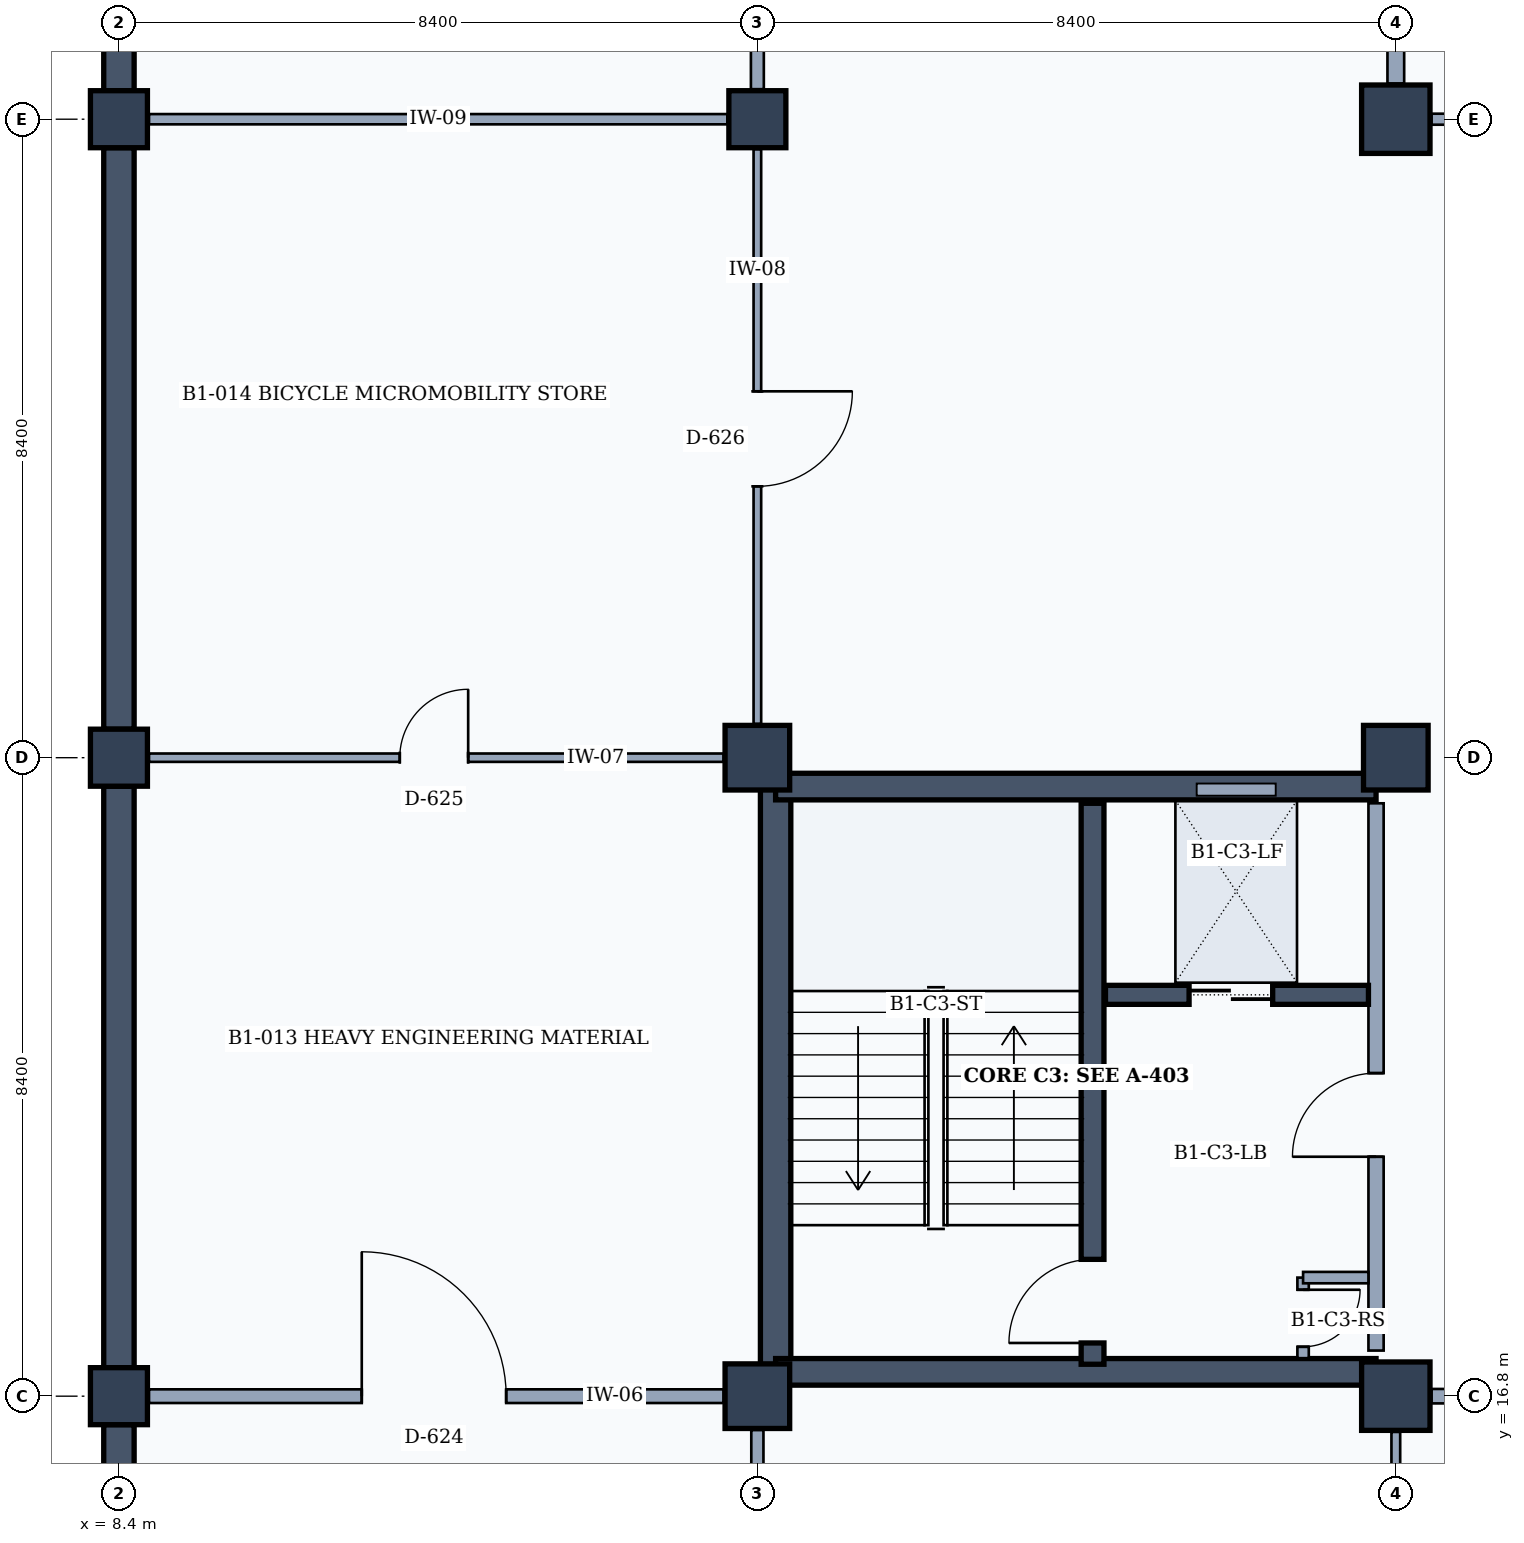
"""IFC4 building model, lengths in metres.
Left out: names, types, materials, properties, quantities, classifications, styles, units other than length and angle.
Written with IfcOpenShell. Run it as: python <this file> out.ifc"""

import sys

from ifc_helpers import new_model, si_unit, direction, frame, frame_2d, origin, origin_2d, place, context, subcontext, project, spatial, rectangle, extrude, element, fill, save


model = new_model("IFC4")
c1 = context("Model", 3, precision=1e-05, world=origin(), true_north=direction((0.0, 1.0)))
c2 = subcontext(c1, "Body", "Model", "MODEL_VIEW")
j1 = project(units=[si_unit("LENGTHUNIT", "METRE"), si_unit("PLANEANGLEUNIT", "RADIAN")], contexts=[c1])
p1 = place(None, origin())
s1 = spatial("IfcSite", under=j1, at=p1, CompositionType="ELEMENT")
p2 = place(p1, origin())
s2 = spatial("IfcBuilding", under=s1, at=p2, CompositionType="ELEMENT")
p3 = place(p2, frame((0.0, 0.0, -4.2)))
s3 = spatial("IfcBuildingStorey", under=s2, at=p3, CompositionType="ELEMENT", Elevation=-4.2)
for number, where, z_axis, x_axis in (
    (1, (8.4, 16.8, 0.0), (0.0, 0.0, 1.0), (1.0, 0.0, 0.0)),
    (2, (8.4, 25.2, 0.0), (0.0, 0.0, 1.0), (1.0, 0.0, 0.0)),
    (3, (8.4, 33.6, 0.0), (0.0, 0.0, 1.0), (1.0, 0.0, 0.0)),
):
    element("IfcColumn", number, at=place(p3, frame(where, z_axis=z_axis, x_axis=x_axis)), inside=s3, PredefinedType="COLUMN", context=c2, shape_type="SweptSolid", body=[
        extrude(rectangle(XDim=0.75, YDim=0.75, at=origin_2d()), origin(), (0.0, 0.0, 1.0), 4.2),
    ])
for number, where, z_axis, x_axis in (
    (4, (16.8, 16.8, 0.0), (0.0, 0.0, 1.0), (1.0, 0.0, 0.0)),
    (5, (16.8, 25.2, 0.0), (0.0, 0.0, 1.0), (1.0, 0.0, 0.0)),
):
    element("IfcColumn", number, at=place(p3, frame(where, z_axis=z_axis, x_axis=x_axis)), inside=s3, PredefinedType="COLUMN", context=c2, shape_type="SweptSolid", body=[
        extrude(rectangle(XDim=0.85, YDim=0.85, at=origin_2d()), origin(), (0.0, 0.0, 1.0), 4.2),
    ])
p4 = place(p3, frame((16.8, 33.6, 0.0), z_axis=(0.0, 0.0, 1.0), x_axis=(1.0, 0.0, 0.0)))
e6 = element("IfcColumn", 6, at=p4, inside=s3, PredefinedType="COLUMN", context=c2, shape_type="SweptSolid", body=[
    extrude(rectangle(XDim=0.75, YDim=0.75, at=origin_2d()), origin(), (0.0, 0.0, 1.0), 4.2),
])
p5 = place(p3, frame((25.2, 16.8, 0.0), z_axis=(0.0, 0.0, 1.0), x_axis=(1.0, 0.0, 0.0)))
e7 = element("IfcColumn", 7, at=p5, inside=s3, PredefinedType="COLUMN", context=c2, shape_type="SweptSolid", body=[
    extrude(rectangle(XDim=0.9, YDim=0.9, at=origin_2d()), origin(), (0.0, 0.0, 1.0), 4.2),
])
p6 = place(p3, frame((25.2, 25.2, 0.0), z_axis=(0.0, 0.0, 1.0), x_axis=(1.0, 0.0, 0.0)))
e8 = element("IfcColumn", 8, at=p6, inside=s3, PredefinedType="COLUMN", context=c2, shape_type="SweptSolid", body=[
    extrude(rectangle(XDim=0.85, YDim=0.85, at=origin_2d()), origin(), (0.0, 0.0, 1.0), 4.2),
])
p7 = place(p3, frame((25.2, 33.6, 0.0), z_axis=(0.0, 0.0, 1.0), x_axis=(1.0, 0.0, 0.0)))
e9 = element("IfcColumn", 9, at=p7, inside=s3, PredefinedType="COLUMN", context=c2, shape_type="SweptSolid", body=[
    extrude(rectangle(XDim=0.9, YDim=0.9, at=origin_2d()), origin(), (0.0, 0.0, 1.0), 4.2),
])
p8 = place(p3, frame((8.4, 8.775, 0.0), z_axis=(0.0, 0.0, 1.0), x_axis=(0.0, 1.0, 0.0)))
e10 = element("IfcWall", 10, at=p8, inside=s3, PredefinedType="STANDARD", context=c2, shape_type="SweptSolid", body=[
    extrude(rectangle(XDim=7.65, YDim=0.4, at=frame_2d((3.825, 0.0))), origin(), (0.0, 0.0, 1.0), 3.88),
])
p9 = place(p3, frame((8.4, 17.175, 0.0), z_axis=(0.0, 0.0, 1.0), x_axis=(0.0, 1.0, 0.0)))
e11 = element("IfcWall", 11, at=p9, inside=s3, PredefinedType="STANDARD", context=c2, shape_type="SweptSolid", body=[
    extrude(rectangle(XDim=7.65, YDim=0.4, at=frame_2d((3.825, 0.0))), origin(), (0.0, 0.0, 1.0), 3.88),
])
p10 = place(p3, frame((8.4, 25.575, 0.0), z_axis=(0.0, 0.0, 1.0), x_axis=(0.0, 1.0, 0.0)))
e12 = element("IfcWall", 12, at=p10, inside=s3, PredefinedType="STANDARD", context=c2, shape_type="SweptSolid", body=[
    extrude(rectangle(XDim=7.65, YDim=0.4, at=frame_2d((3.825, 0.0))), origin(), (0.0, 0.0, 1.0), 3.88),
])
p11 = place(p3, frame((8.4, 33.975, 0.0), z_axis=(0.0, 0.0, 1.0), x_axis=(0.0, 1.0, 0.0)))
e13 = element("IfcWall", 13, at=p11, inside=s3, PredefinedType="STANDARD", context=c2, shape_type="SweptSolid", body=[
    extrude(rectangle(XDim=7.7, YDim=0.4, at=frame_2d((3.85, 0.0))), origin(), (0.0, 0.0, 1.0), 3.88),
])
p12 = place(p3, frame((17.04, 17.05, 0.0), z_axis=(0.0, 0.0, 1.0), x_axis=(0.0, 1.0, 0.0)))
e14 = element("IfcWall", 14, at=p12, inside=s3, PredefinedType="SHEAR", context=c2, shape_type="SweptSolid", body=[
    extrude(rectangle(XDim=7.94, YDim=0.4, at=frame_2d((3.97, 0.0))), origin(), (0.0, 0.0, 1.0), 3.9),
])
p13 = place(p3, frame((17.04, 24.82, 0.0), z_axis=(0.0, 0.0, 1.0), x_axis=(1.0, 0.0, 0.0)))
e15 = element("IfcWall", 15, at=p13, inside=s3, PredefinedType="SHEAR", context=c2, shape_type="SweptSolid", body=[
    extrude(rectangle(XDim=7.9, YDim=0.35, at=frame_2d((3.95, 0.0))), origin(), (0.0, 0.0, 1.0), 3.9),
])
p14 = place(p3, frame((24.94, 24.6, 0.0), z_axis=(0.0, 0.0, 1.0), x_axis=(0.0, -1.0, 0.0)))
e16 = element("IfcWall", 16, at=p14, inside=s3, PredefinedType="PARTITIONING", context=c2, shape_type="SweptSolid", body=[
    extrude(rectangle(XDim=7.2, YDim=0.2, at=frame_2d((3.6, 0.0))), origin(), (0.0, 0.0, 1.0), 3.25),
])
p15 = place(p14, frame((3.55, 0.0, 0.0)))
e17 = element("IfcOpeningElement", 17, at=p15, cuts=e16, PredefinedType="OPENING", context=c2, shape_type="SweptSolid", body=[
    extrude(rectangle(XDim=1.1, YDim=2.15, at=frame_2d((0.55, 1.075))), frame((0.0, 0.11, 0.0), z_axis=(0.0, -1.0, 0.0), x_axis=(1.0, 0.0, 0.0)), (0.0, 0.0, 1.0), 0.22),
])
p16 = place(p3, frame((24.94, 17.12, 0.0), z_axis=(0.0, 0.0, 1.0), x_axis=(-1.0, 0.0, 0.0)))
e18 = element("IfcWall", 18, at=p16, inside=s3, PredefinedType="SHEAR", context=c2, shape_type="SweptSolid", body=[
    extrude(rectangle(XDim=7.9, YDim=0.35, at=frame_2d((3.95, 0.0))), origin(), (0.0, 0.0, 1.0), 3.9),
])
p17 = place(p3, frame((21.21, 17.22, 0.0), z_axis=(0.0, 0.0, 1.0), x_axis=(0.0, 1.0, 0.0)))
e19 = element("IfcWall", 19, at=p17, inside=s3, PredefinedType="SHEAR", context=c2, shape_type="SweptSolid", body=[
    extrude(rectangle(XDim=7.38, YDim=0.3, at=frame_2d((3.69, 0.0))), origin(), (0.0, 0.0, 1.0), 3.9),
])
p18 = place(p17, frame((0.28, 0.0, 0.0)))
e20 = element("IfcOpeningElement", 20, at=p18, cuts=e19, PredefinedType="OPENING", context=c2, shape_type="SweptSolid", body=[
    extrude(rectangle(XDim=1.1, YDim=2.15, at=frame_2d((0.55, 1.075))), frame((0.0, 0.16, 0.0), z_axis=(0.0, -1.0, 0.0), x_axis=(1.0, 0.0, 0.0)), (0.0, 0.0, 1.0), 0.32),
])
p19 = place(p3, frame((23.98, 18.36, 0.0), z_axis=(0.0, 0.0, 1.0), x_axis=(0.0, -1.0, 0.0)))
e21 = element("IfcWall", 21, at=p19, inside=s3, PredefinedType="PARTITIONING", context=c2, shape_type="SweptSolid", body=[
    extrude(rectangle(XDim=1.06, YDim=0.15, at=frame_2d((0.53, 0.0))), origin(), (0.0, 0.0, 1.0), 3.32),
])
p20 = place(p19, frame((0.16, 0.0, 0.0)))
e22 = element("IfcOpeningElement", 22, at=p20, cuts=e21, PredefinedType="OPENING", context=c2, shape_type="SweptSolid", body=[
    extrude(rectangle(XDim=0.75, YDim=2.05, at=frame_2d((0.375, 1.025))), frame((0.0, 0.085, 0.0), z_axis=(0.0, -1.0, 0.0), x_axis=(1.0, 0.0, 0.0)), (0.0, 0.0, 1.0), 0.17),
])
p21 = place(p3, frame((23.98, 18.36, 0.0), z_axis=(0.0, 0.0, 1.0), x_axis=(1.0, 0.0, 0.0)))
e23 = element("IfcWall", 23, at=p21, inside=s3, PredefinedType="PARTITIONING", context=c2, shape_type="SweptSolid", body=[
    extrude(rectangle(XDim=0.86, YDim=0.15, at=frame_2d((0.43, 0.0))), origin(), (0.0, 0.0, 1.0), 3.32),
])
p22 = place(p3, frame((21.38, 22.08, 0.0), z_axis=(0.0, 0.0, 1.0), x_axis=(1.0, 0.0, 0.0)))
e24 = element("IfcWall", 24, at=p22, inside=s3, PredefinedType="SHEAR", context=c2, shape_type="SweptSolid", body=[
    extrude(rectangle(XDim=3.46, YDim=0.25, at=frame_2d((1.73, 0.0))), origin(), (0.0, 0.0, 1.0), 3.9),
])
p23 = place(p22, frame((1.1, 0.0, 0.0)))
e25 = element("IfcOpeningElement", 25, at=p23, cuts=e24, PredefinedType="OPENING", context=c2, shape_type="SweptSolid", body=[
    extrude(rectangle(XDim=1.1, YDim=2.15, at=frame_2d((0.55, 1.075))), frame((0.0, 0.135, 0.0), z_axis=(0.0, -1.0, 0.0), x_axis=(1.0, 0.0, 0.0)), (0.0, 0.0, 1.0), 0.27),
])
p24 = place(p3, frame((16.8, 8.795, 0.0), z_axis=(0.0, 0.0, 1.0), x_axis=(0.0, 1.0, 0.0)))
e26 = element("IfcWall", 26, at=p24, inside=s3, PredefinedType="PARTITIONING", context=c2, shape_type="SweptSolid", body=[
    extrude(rectangle(XDim=7.56, YDim=0.16, at=frame_2d((3.78, 0.0))), origin(), (0.0, 0.0, 1.0), 3.25),
])
p25 = place(p3, frame((8.795, 16.8, 0.0), z_axis=(0.0, 0.0, 1.0), x_axis=(1.0, 0.0, 0.0)))
e27 = element("IfcWall", 27, at=p25, inside=s3, PredefinedType="PARTITIONING", context=c2, shape_type="SweptSolid", body=[
    extrude(rectangle(XDim=7.56, YDim=0.18, at=frame_2d((3.78, 0.0))), origin(), (0.0, 0.0, 1.0), 3.05),
])
p26 = place(p25, frame((2.8, 0.0, 0.0)))
e28 = element("IfcOpeningElement", 28, at=p26, cuts=e27, PredefinedType="OPENING", context=c2, shape_type="SweptSolid", body=[
    extrude(rectangle(XDim=1.9, YDim=2.4, at=frame_2d((0.95, 1.2))), frame((0.0, 0.1, 0.0), z_axis=(0.0, -1.0, 0.0), x_axis=(1.0, 0.0, 0.0)), (0.0, 0.0, 1.0), 0.2),
])
p27 = place(p3, frame((8.795, 25.2, 0.0), z_axis=(0.0, 0.0, 1.0), x_axis=(1.0, 0.0, 0.0)))
e29 = element("IfcWall", 29, at=p27, inside=s3, PredefinedType="PARTITIONING", context=c2, shape_type="SweptSolid", body=[
    extrude(rectangle(XDim=7.56, YDim=0.11, at=frame_2d((3.78, 0.0))), origin(), (0.0, 0.0, 1.0), 3.05),
])
p28 = place(p27, frame((3.3, 0.0, 0.0)))
e30 = element("IfcOpeningElement", 30, at=p28, cuts=e29, PredefinedType="OPENING", context=c2, shape_type="SweptSolid", body=[
    extrude(rectangle(XDim=0.9, YDim=2.1, at=frame_2d((0.45, 1.05))), frame((0.0, 0.065, 0.0), z_axis=(0.0, -1.0, 0.0), x_axis=(1.0, 0.0, 0.0)), (0.0, 0.0, 1.0), 0.13),
])
p29 = place(p3, frame((16.8, 25.645, 0.0), z_axis=(0.0, 0.0, 1.0), x_axis=(0.0, 1.0, 0.0)))
e31 = element("IfcWall", 31, at=p29, inside=s3, PredefinedType="MOVABLE", context=c2, shape_type="SweptSolid", body=[
    extrude(rectangle(XDim=7.56, YDim=0.1, at=frame_2d((3.78, 0.0))), origin(), (0.0, 0.0, 1.0), 3.25),
])
p30 = place(p29, frame((3.125, 0.0, 0.0)))
e32 = element("IfcOpeningElement", 32, at=p30, cuts=e31, PredefinedType="OPENING", context=c2, shape_type="SweptSolid", body=[
    extrude(rectangle(XDim=1.25, YDim=2.3, at=frame_2d((0.625, 1.15))), frame((0.0, 0.06, 0.0), z_axis=(0.0, -1.0, 0.0), x_axis=(1.0, 0.0, 0.0)), (0.0, 0.0, 1.0), 0.12),
])
p31 = place(p3, frame((8.795, 33.6, 0.0), z_axis=(0.0, 0.0, 1.0), x_axis=(1.0, 0.0, 0.0)))
e33 = element("IfcWall", 33, at=p31, inside=s3, PredefinedType="PARTITIONING", context=c2, shape_type="SweptSolid", body=[
    extrude(rectangle(XDim=7.61, YDim=0.135, at=frame_2d((3.805, 0.0))), origin(), (0.0, 0.0, 1.0), 3.05),
])
p32 = place(p3, frame((16.8, 33.995, 0.0), z_axis=(0.0, 0.0, 1.0), x_axis=(0.0, 1.0, 0.0)))
e34 = element("IfcWall", 34, at=p32, inside=s3, PredefinedType="PARTITIONING", context=c2, shape_type="SweptSolid", body=[
    extrude(rectangle(XDim=7.66, YDim=0.17, at=frame_2d((3.83, 0.0))), origin(), (0.0, 0.0, 1.0), 3.25),
])
p33 = place(p32, frame((3.075, 0.0, 0.0)))
e35 = element("IfcOpeningElement", 35, at=p33, cuts=e34, PredefinedType="OPENING", context=c2, shape_type="SweptSolid", body=[
    extrude(rectangle(XDim=1.35, YDim=2.25, at=frame_2d((0.675, 1.125))), frame((0.0, 0.095, 0.0), z_axis=(0.0, -1.0, 0.0), x_axis=(1.0, 0.0, 0.0)), (0.0, 0.0, 1.0), 0.19),
])
p34 = place(p3, frame((25.2, 8.795, 0.0), z_axis=(0.0, 0.0, 1.0), x_axis=(0.0, 1.0, 0.0)))
e36 = element("IfcWall", 36, at=p34, inside=s3, PredefinedType="PARTITIONING", context=c2, shape_type="SweptSolid", body=[
    extrude(rectangle(XDim=7.535, YDim=0.115, at=frame_2d((3.768, 0.0))), origin(), (0.0, 0.0, 1.0), 3.25),
])
p35 = place(p34, frame((3.175, 0.0, 0.0)))
e37 = element("IfcOpeningElement", 37, at=p35, cuts=e36, PredefinedType="OPENING", context=c2, shape_type="SweptSolid", body=[
    extrude(rectangle(XDim=1.15, YDim=2.25, at=frame_2d((0.575, 1.125))), frame((0.0, 0.067, 0.0), z_axis=(0.0, -1.0, 0.0), x_axis=(1.0, 0.0, 0.0)), (0.0, 0.0, 1.0), 0.135),
])
p36 = place(p3, frame((25.2, 34.07, 0.0), z_axis=(0.0, 0.0, 1.0), x_axis=(0.0, 1.0, 0.0)))
e38 = element("IfcWall", 38, at=p36, inside=s3, PredefinedType="PARTITIONING", context=c2, shape_type="SweptSolid", body=[
    extrude(rectangle(XDim=7.585, YDim=0.22, at=frame_2d((3.792, 0.0))), origin(), (0.0, 0.0, 1.0), 3.25),
])
p37 = place(p36, frame((3.1, 0.0, 0.0)))
e39 = element("IfcOpeningElement", 39, at=p37, cuts=e38, PredefinedType="OPENING", context=c2, shape_type="SweptSolid", body=[
    extrude(rectangle(XDim=1.3, YDim=2.2, at=frame_2d((0.65, 1.1))), frame((0.0, 0.12, 0.0), z_axis=(0.0, -1.0, 0.0), x_axis=(1.0, 0.0, 0.0)), (0.0, 0.0, 1.0), 0.24),
])
p38 = place(p3, frame((25.67, 16.8, 0.0), z_axis=(0.0, 0.0, 1.0), x_axis=(1.0, 0.0, 0.0)))
e40 = element("IfcWall", 40, at=p38, inside=s3, PredefinedType="PARTITIONING", context=c2, shape_type="SweptSolid", body=[
    extrude(rectangle(XDim=7.535, YDim=0.19, at=frame_2d((3.768, 0.0))), origin(), (0.0, 0.0, 1.0), 3.05),
])
p39 = place(p38, frame((2.85, 0.0, 0.0)))
e41 = element("IfcOpeningElement", 41, at=p39, cuts=e40, PredefinedType="OPENING", context=c2, shape_type="SweptSolid", body=[
    extrude(rectangle(XDim=1.8, YDim=2.3, at=frame_2d((0.9, 1.15))), frame((0.0, 0.105, 0.0), z_axis=(0.0, -1.0, 0.0), x_axis=(1.0, 0.0, 0.0)), (0.0, 0.0, 1.0), 0.21),
])
p40 = place(p3, frame((25.67, 33.6, 0.0), z_axis=(0.0, 0.0, 1.0), x_axis=(1.0, 0.0, 0.0)))
e42 = element("IfcWall", 42, at=p40, inside=s3, PredefinedType="PARTITIONING", context=c2, shape_type="SweptSolid", body=[
    extrude(rectangle(XDim=7.535, YDim=0.145, at=frame_2d((3.768, 0.0))), origin(), (0.0, 0.0, 1.0), 3.05),
])
p41 = place(p15, frame((1.1, 0.0, 0.0), z_axis=(0.0, 0.0, 1.0), x_axis=(-1.0, 0.0, 0.0)))
e43 = element("IfcDoor", 43, at=p41, inside=s3, OperationType="SINGLE_SWING_LEFT", PredefinedType="DOOR", context=c2, shape_type="SweptSolid", body=[
    extrude(rectangle(XDim=1.1, YDim=2.15, at=frame_2d((0.55, 1.075))), frame((0.0, 0.025, 0.0), z_axis=(0.0, -1.0, 0.0), x_axis=(1.0, 0.0, 0.0)), (0.0, 0.0, 1.0), 0.05),
])
fill(e17, e43)
p42 = place(p18, origin())
e44 = element("IfcDoor", 44, at=p42, inside=s3, OperationType="SINGLE_SWING_LEFT", PredefinedType="DOOR", context=c2, shape_type="SweptSolid", body=[
    extrude(rectangle(XDim=1.1, YDim=2.15, at=frame_2d((0.55, 1.075))), frame((0.0, 0.025, 0.0), z_axis=(0.0, -1.0, 0.0), x_axis=(1.0, 0.0, 0.0)), (0.0, 0.0, 1.0), 0.05),
])
fill(e20, e44)
p43 = place(p20, origin())
e45 = element("IfcDoor", 45, at=p43, inside=s3, OperationType="SINGLE_SWING_LEFT", PredefinedType="TRAPDOOR", context=c2, shape_type="SweptSolid", body=[
    extrude(rectangle(XDim=0.75, YDim=2.05, at=frame_2d((0.375, 1.025))), frame((0.0, 0.025, 0.0), z_axis=(0.0, -1.0, 0.0), x_axis=(1.0, 0.0, 0.0)), (0.0, 0.0, 1.0), 0.05),
])
fill(e22, e45)
p44 = place(p23, origin())
e46 = element("IfcDoor", 46, at=p44, inside=s3, OperationType="DOUBLE_DOOR_SLIDING", PredefinedType="DOOR", context=c2, shape_type="SweptSolid", body=[
    extrude(rectangle(XDim=1.1, YDim=2.15, at=frame_2d((0.55, 1.075))), frame((0.0, 0.025, 0.0), z_axis=(0.0, -1.0, 0.0), x_axis=(1.0, 0.0, 0.0)), (0.0, 0.0, 1.0), 0.05),
])
fill(e25, e46)
p45 = place(p26, origin())
e47 = element("IfcDoor", 47, at=p45, inside=s3, OperationType="SINGLE_SWING_LEFT", PredefinedType="DOOR", context=c2, shape_type="SweptSolid", body=[
    extrude(rectangle(XDim=1.9, YDim=2.4, at=frame_2d((0.95, 1.2))), frame((0.0, 0.025, 0.0), z_axis=(0.0, -1.0, 0.0), x_axis=(1.0, 0.0, 0.0)), (0.0, 0.0, 1.0), 0.05),
])
fill(e28, e47)
p46 = place(p28, origin())
e48 = element("IfcDoor", 48, at=p46, inside=s3, OperationType="SINGLE_SWING_RIGHT", PredefinedType="DOOR", context=c2, shape_type="SweptSolid", body=[
    extrude(rectangle(XDim=0.9, YDim=2.1, at=frame_2d((0.45, 1.05))), frame((0.0, 0.025, 0.0), z_axis=(0.0, -1.0, 0.0), x_axis=(1.0, 0.0, 0.0)), (0.0, 0.0, 1.0), 0.05),
])
fill(e30, e48)
p47 = place(p30, frame((1.25, 0.0, 0.0), z_axis=(0.0, 0.0, 1.0), x_axis=(-1.0, 0.0, 0.0)))
e49 = element("IfcDoor", 49, at=p47, inside=s3, OperationType="SINGLE_SWING_LEFT", PredefinedType="DOOR", context=c2, shape_type="SweptSolid", body=[
    extrude(rectangle(XDim=1.25, YDim=2.3, at=frame_2d((0.625, 1.15))), frame((0.0, 0.025, 0.0), z_axis=(0.0, -1.0, 0.0), x_axis=(1.0, 0.0, 0.0)), (0.0, 0.0, 1.0), 0.05),
])
fill(e32, e49)
save(model, sys.argv[1])
